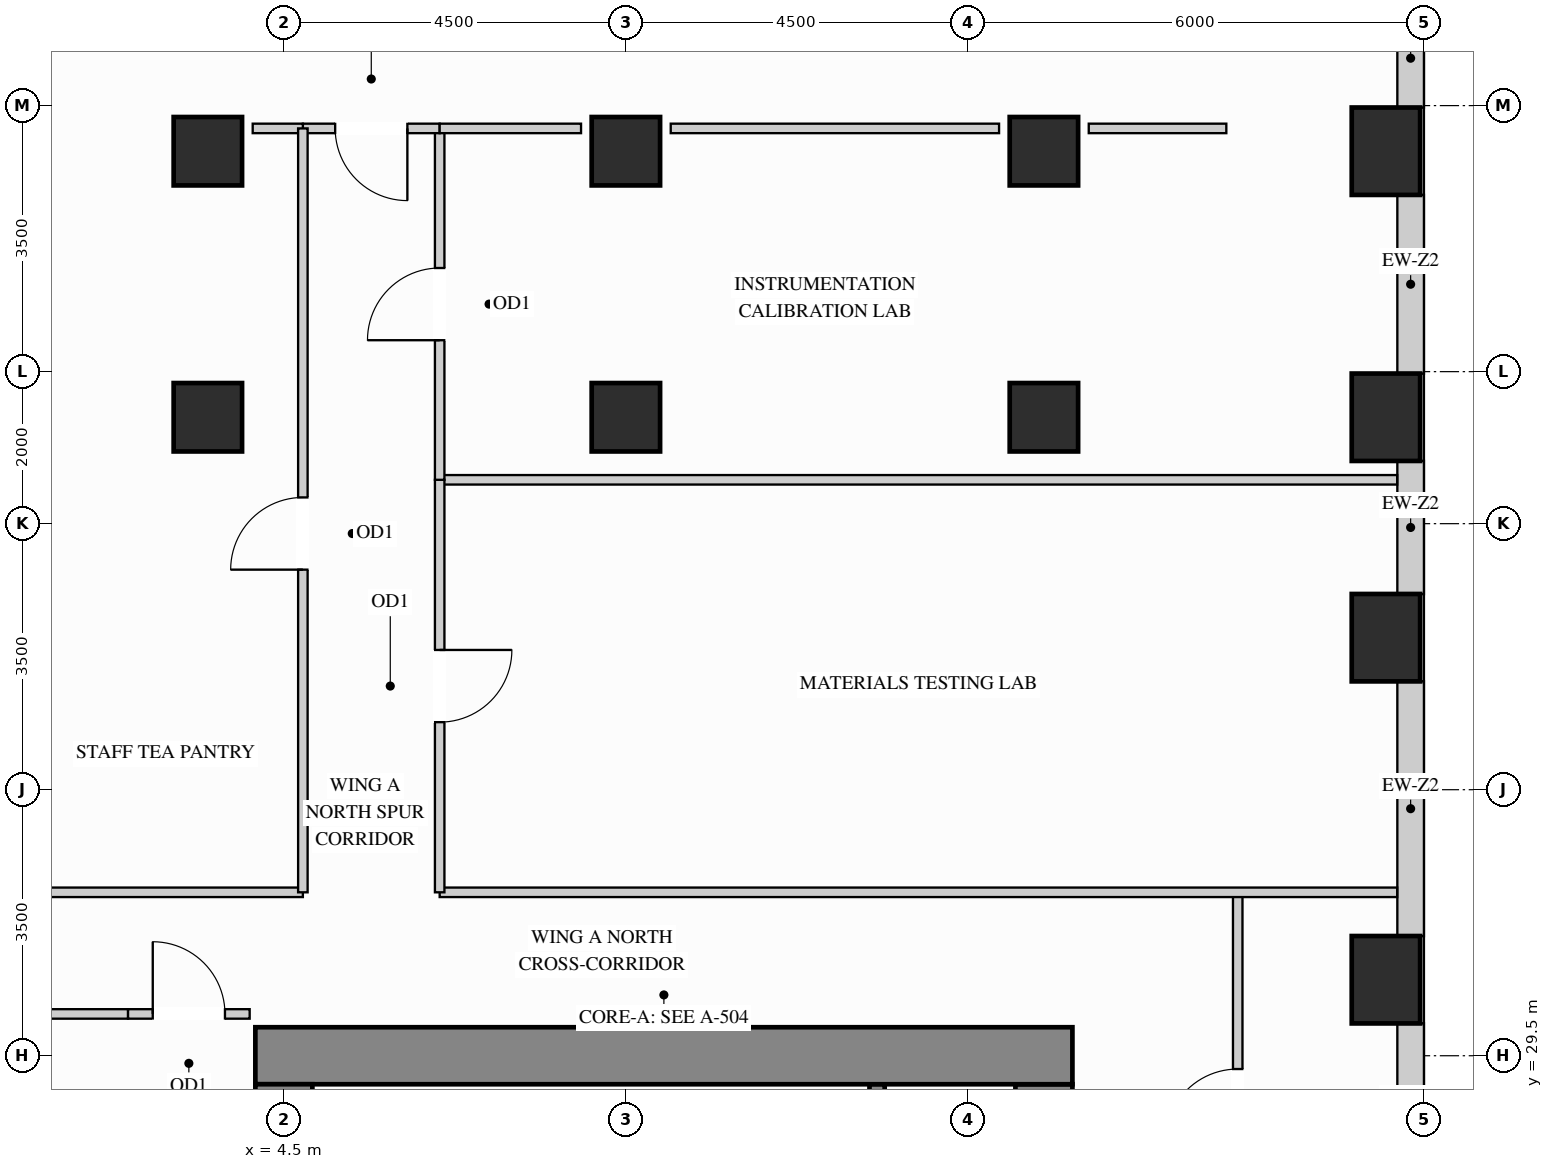
"""IFC4 building model, lengths in metres.
Left out: names, types, materials, properties, quantities, classifications, styles, units other than length and angle.
Written with IfcOpenShell. Run it as: python <this file> out.ifc"""

import sys

from ifc_helpers import new_model, si_unit, direction, frame, frame_2d, origin, origin_2d, place, context, subcontext, project, spatial, rectangle, extrude, source, transform, mapped, element, fill, save


model = new_model("IFC4")
c1 = context("Model", 3, precision=1e-05, world=origin(), true_north=direction((0.0, 1.0)))
c2 = subcontext(c1, "Body", "Model", "MODEL_VIEW")
j1 = project(units=[si_unit("LENGTHUNIT", "METRE"), si_unit("PLANEANGLEUNIT", "RADIAN")], contexts=[c1])
p1 = place(None, origin())
s1 = spatial("IfcSite", under=j1, at=p1, CompositionType="ELEMENT")
p2 = place(p1, origin())
s2 = spatial("IfcBuilding", under=s1, at=p2, CompositionType="ELEMENT")
p3 = place(p2, frame((0.0, 0.0, 120.6)))
s3 = spatial("IfcBuildingStorey", under=s2, at=p3, CompositionType="ELEMENT", Elevation=120.6)
m1 = source(origin(), c2, "Body", "SweptSolid", [
    extrude(rectangle(XDim=0.9, YDim=0.9, at=origin_2d()), origin(), (0.0, 0.0, 1.0), 3.38),
])
for number, where, z_axis, x_axis in (
    (1, (14.5, 37.9, 0.0), (0.0, 0.0, 1.0), (1.0, 0.0, 0.0)),
    (2, (14.5, 41.4, 0.0), (0.0, 0.0, 1.0), (1.0, 0.0, 0.0)),
    (3, (3.5, 37.9, 0.0), (0.0, 0.0, 1.0), (1.0, 0.0, 0.0)),
    (4, (3.5, 41.4, 0.0), (0.0, 0.0, 1.0), (1.0, 0.0, 0.0)),
    (5, (9.0, 37.9, 0.0), (0.0, 0.0, 1.0), (1.0, 0.0, 0.0)),
    (6, (9.0, 41.4, 0.0), (0.0, 0.0, 1.0), (1.0, 0.0, 0.0)),
):
    element("IfcColumn", number, at=place(p3, frame(where, z_axis=z_axis, x_axis=x_axis)), inside=s3, PredefinedType="COLUMN", context=c2, shape_type="MappedRepresentation", body=[
        mapped(m1, transform((0.0, 0.0, 0.0), x_axis=(1.0, 0.0, 0.0), y_axis=(0.0, 1.0, 0.0), z_axis=(0.0, 0.0, 1.0))),
    ])
m2 = source(origin(), c2, "Body", "SweptSolid", [
    extrude(rectangle(XDim=0.9, YDim=1.15, at=origin_2d()), origin(), (0.0, 0.0, 1.0), 3.38),
])
for number, where, z_axis, x_axis in (
    (7, (19.0, 30.5, 0.0), (0.0, 0.0, 1.0), (1.0, 0.0, 0.0)),
    (8, (19.0, 35.0, 0.0), (0.0, 0.0, 1.0), (1.0, 0.0, 0.0)),
    (9, (19.0, 37.9, 0.0), (0.0, 0.0, 1.0), (1.0, 0.0, 0.0)),
    (10, (19.0, 41.4, 0.0), (0.0, 0.0, 1.0), (1.0, 0.0, 0.0)),
):
    element("IfcColumn", number, at=place(p3, frame(where, z_axis=z_axis, x_axis=x_axis)), inside=s3, PredefinedType="COLUMN", context=c2, shape_type="MappedRepresentation", body=[
        mapped(m2, transform((0.0, 0.0, 0.0), x_axis=(1.0, 0.0, 0.0), y_axis=(0.0, 1.0, 0.0), z_axis=(0.0, 0.0, 1.0))),
    ])
m3 = source(origin(), c2, "Body", "SweptSolid", [
    extrude(rectangle(XDim=8.245, YDim=0.75, at=frame_2d((4.123, 0.0))), origin(), (0.0, 0.0, 1.0), 3.38),
])
p4 = place(p3, frame((14.5, 20.88, 0.0), z_axis=(0.0, 0.0, 1.0), x_axis=(0.0, 1.0, 0.0)))
e11 = element("IfcWall", 11, at=p4, inside=s3, PredefinedType="SHEAR", context=c2, shape_type="MappedRepresentation", body=[
    mapped(m3, transform((0.0, 0.0, 0.0), x_axis=(1.0, 0.0, 0.0), y_axis=(0.0, 1.0, 0.0), z_axis=(0.0, 0.0, 1.0))),
])
m4 = source(origin(), c2, "Body", "SweptSolid", [
    extrude(rectangle(XDim=10.75, YDim=0.75, at=frame_2d((5.375, 0.0))), origin(), (0.0, 0.0, 1.0), 3.38),
])
p5 = place(p3, frame((4.125, 29.5, 0.0), z_axis=(0.0, 0.0, 1.0), x_axis=(1.0, 0.0, 0.0)))
e12 = element("IfcWall", 12, at=p5, inside=s3, PredefinedType="SHEAR", context=c2, shape_type="MappedRepresentation", body=[
    mapped(m4, transform((0.0, 0.0, 0.0), x_axis=(1.0, 0.0, 0.0), y_axis=(0.0, 1.0, 0.0), z_axis=(0.0, 0.0, 1.0))),
])
m5 = source(origin(), c2, "Body", "SweptSolid", [
    extrude(rectangle(XDim=20.25, YDim=0.75, at=frame_2d((10.125, 0.0))), origin(), (0.0, 0.0, 1.0), 3.38),
])
p6 = place(p3, frame((4.5, 8.875, 0.0), z_axis=(0.0, 0.0, 1.0), x_axis=(0.0, 1.0, 0.0)))
e13 = element("IfcWall", 13, at=p6, inside=s3, PredefinedType="SHEAR", context=c2, shape_type="MappedRepresentation", body=[
    mapped(m5, transform((0.0, 0.0, 0.0), x_axis=(1.0, 0.0, 0.0), y_axis=(0.0, 1.0, 0.0), z_axis=(0.0, 0.0, 1.0))),
])
p7 = place(p3, frame((19.325, 27.373, 0.0), z_axis=(0.0, 0.0, 1.0), x_axis=(0.0, 1.0, 0.0)))
e14 = element("IfcWall", 14, at=p7, inside=s3, PredefinedType="SOLIDWALL", context=c2, shape_type="SweptSolid", body=[
    extrude(rectangle(XDim=2.554, YDim=0.35, at=frame_2d((1.277, 0.0))), origin(), (0.0, 0.0, 1.0), 2.519),
])
p8 = place(p7, frame((0.48, 0.0, 0.78)))
e15 = element("IfcOpeningElement", 15, at=p8, cuts=e14, PredefinedType="OPENING", context=c2, shape_type="SweptSolid", body=[
    extrude(rectangle(XDim=1.2, YDim=1.559, at=frame_2d((0.6, 0.78))), frame((0.0, 0.185, 0.0), z_axis=(0.0, -1.0, 0.0), x_axis=(1.0, 0.0, 0.0)), (0.0, 0.0, 1.0), 0.37),
])
m6 = source(origin(), c2, "Body", "SweptSolid", [
    extrude(rectangle(XDim=3.354, YDim=0.35, at=frame_2d((1.677, 0.0))), origin(), (0.0, 0.0, 1.0), 2.519),
])
p9 = place(p3, frame((19.325, 31.073, 0.0), z_axis=(0.0, 0.0, 1.0), x_axis=(0.0, 1.0, 0.0)))
e16 = element("IfcWall", 16, at=p9, inside=s3, PredefinedType="SOLIDWALL", context=c2, shape_type="MappedRepresentation", body=[
    mapped(m6, transform((0.0, 0.0, 0.0), x_axis=(1.0, 0.0, 0.0), y_axis=(0.0, 1.0, 0.0), z_axis=(0.0, 0.0, 1.0))),
])
m7 = source(origin(), c2, "Body", "SweptSolid", [
    extrude(rectangle(XDim=1.754, YDim=0.35, at=frame_2d((0.877, 0.0))), origin(), (0.0, 0.0, 1.0), 2.519),
])
p10 = place(p3, frame((19.325, 35.573, 0.0), z_axis=(0.0, 0.0, 1.0), x_axis=(0.0, 1.0, 0.0)))
e17 = element("IfcWall", 17, at=p10, inside=s3, PredefinedType="SOLIDWALL", context=c2, shape_type="MappedRepresentation", body=[
    mapped(m7, transform((0.0, 0.0, 0.0), x_axis=(1.0, 0.0, 0.0), y_axis=(0.0, 1.0, 0.0), z_axis=(0.0, 0.0, 1.0))),
])
m8 = source(origin(), c2, "Body", "SweptSolid", [
    extrude(rectangle(XDim=2.354, YDim=0.35, at=frame_2d((1.177, 0.0))), origin(), (0.0, 0.0, 1.0), 2.519),
])
p11 = place(p3, frame((19.325, 38.473, 0.0), z_axis=(0.0, 0.0, 1.0), x_axis=(0.0, 1.0, 0.0)))
e18 = element("IfcWall", 18, at=p11, inside=s3, PredefinedType="SOLIDWALL", context=c2, shape_type="MappedRepresentation", body=[
    mapped(m8, transform((0.0, 0.0, 0.0), x_axis=(1.0, 0.0, 0.0), y_axis=(0.0, 1.0, 0.0), z_axis=(0.0, 0.0, 1.0))),
])
m9 = source(origin(), c2, "Body", "SweptSolid", [
    extrude(rectangle(XDim=1.179, YDim=0.35, at=frame_2d((0.59, 0.0))), origin(), (0.0, 0.0, 1.0), 3.365),
])
p12 = place(p3, frame((19.325, 41.973, 0.0), z_axis=(0.0, 0.0, 1.0), x_axis=(0.0, 1.0, 0.0)))
e19 = element("IfcWall", 19, at=p12, inside=s3, PredefinedType="SOLIDWALL", context=c2, shape_type="MappedRepresentation", body=[
    mapped(m9, transform((0.0, 0.0, 0.0), x_axis=(1.0, 0.0, 0.0), y_axis=(0.0, 1.0, 0.0), z_axis=(0.0, 0.0, 1.0))),
])
p13 = place(p3, frame((17.05, 26.05, 0.0), z_axis=(0.0, 0.0, 1.0), x_axis=(0.0, 1.0, 0.0)))
e20 = element("IfcWall", 20, at=p13, inside=s3, PredefinedType="PARTITIONING", context=c2, shape_type="SweptSolid", body=[
    extrude(rectangle(XDim=5.6, YDim=0.125, at=frame_2d((2.8, 0.0))), origin(), (0.0, 0.0, 1.0), 3.365),
])
p14 = place(p13, frame((2.325, 0.0, 0.0)))
e21 = element("IfcOpeningElement", 21, at=p14, cuts=e20, PredefinedType="OPENING", context=c2, shape_type="SweptSolid", body=[
    extrude(rectangle(XDim=0.95, YDim=2.15, at=frame_2d((0.475, 1.075))), frame((0.0, 0.073, 0.0), z_axis=(0.0, -1.0, 0.0), x_axis=(1.0, 0.0, 0.0)), (0.0, 0.0, 1.0), 0.145),
])
m10 = source(origin(), c2, "Body", "SweptSolid", [
    extrude(rectangle(XDim=12.598, YDim=0.125, at=frame_2d((6.299, 0.0))), origin(), (0.0, 0.0, 1.0), 3.365),
])
p15 = place(p3, frame((6.55, 37.077, 0.0), z_axis=(0.0, 0.0, 1.0), x_axis=(1.0, 0.0, 0.0)))
e22 = element("IfcWall", 22, at=p15, inside=s3, PredefinedType="PARTITIONING", context=c2, shape_type="MappedRepresentation", body=[
    mapped(m10, transform((0.0, 0.0, 0.0), x_axis=(1.0, 0.0, 0.0), y_axis=(0.0, 1.0, 0.0), z_axis=(0.0, 0.0, 1.0))),
])
m11 = source(origin(), c2, "Body", "SweptSolid", [
    extrude(rectangle(XDim=12.598, YDim=0.125, at=frame_2d((6.299, 0.0))), origin(), (0.0, 0.0, 1.0), 2.828),
])
p16 = place(p3, frame((6.55, 31.65, 0.0), z_axis=(0.0, 0.0, 1.0), x_axis=(1.0, 0.0, 0.0)))
e23 = element("IfcWall", 23, at=p16, inside=s3, PredefinedType="PARTITIONING", context=c2, shape_type="MappedRepresentation", body=[
    mapped(m11, transform((0.0, 0.0, 0.0), x_axis=(1.0, 0.0, 0.0), y_axis=(0.0, 1.0, 0.0), z_axis=(0.0, 0.0, 1.0))),
])
m12 = source(origin(), c2, "Body", "SweptSolid", [
    extrude(rectangle(XDim=4.398, YDim=0.125, at=frame_2d((2.199, 0.0))), origin(), (0.0, 0.0, 1.0), 2.828),
])
p17 = place(p3, frame((0.352, 31.65, 0.0), z_axis=(0.0, 0.0, 1.0), x_axis=(1.0, 0.0, 0.0)))
e24 = element("IfcWall", 24, at=p17, inside=s3, PredefinedType="PARTITIONING", context=c2, shape_type="MappedRepresentation", body=[
    mapped(m12, transform((0.0, 0.0, 0.0), x_axis=(1.0, 0.0, 0.0), y_axis=(0.0, 1.0, 0.0), z_axis=(0.0, 0.0, 1.0))),
])
m13 = source(origin(), c2, "Body", "SweptSolid", [
    extrude(rectangle(XDim=1.26, YDim=0.125, at=frame_2d((0.63, 0.0))), origin(), (0.0, 0.0, 1.0), 3.365),
])
p18 = place(p3, frame((1.19, 30.05, 0.0), z_axis=(0.0, 0.0, 1.0), x_axis=(1.0, 0.0, 0.0)))
e25 = element("IfcWall", 25, at=p18, inside=s3, PredefinedType="PARTITIONING", context=c2, shape_type="MappedRepresentation", body=[
    mapped(m13, transform((0.0, 0.0, 0.0), x_axis=(1.0, 0.0, 0.0), y_axis=(0.0, 1.0, 0.0), z_axis=(0.0, 0.0, 1.0))),
])
p19 = place(p3, frame((2.45, 30.05, 0.0), z_axis=(0.0, 0.0, 1.0), x_axis=(1.0, 0.0, 0.0)))
e26 = element("IfcWall", 26, at=p19, inside=s3, PredefinedType="PARTITIONING", context=c2, shape_type="SweptSolid", body=[
    extrude(rectangle(XDim=1.6, YDim=0.125, at=frame_2d((0.8, 0.0))), origin(), (0.0, 0.0, 1.0), 3.365),
])
p20 = place(p19, frame((0.325, 0.0, 0.0)))
e27 = element("IfcOpeningElement", 27, at=p20, cuts=e26, PredefinedType="OPENING", context=c2, shape_type="SweptSolid", body=[
    extrude(rectangle(XDim=0.95, YDim=2.15, at=frame_2d((0.475, 1.075))), frame((0.0, 0.073, 0.0), z_axis=(0.0, -1.0, 0.0), x_axis=(1.0, 0.0, 0.0)), (0.0, 0.0, 1.0), 0.145),
])
p21 = place(p3, frame((6.55, 31.65, 0.0), z_axis=(0.0, 0.0, 1.0), x_axis=(0.0, 1.0, 0.0)))
e28 = element("IfcWall", 28, at=p21, inside=s3, PredefinedType="PARTITIONING", context=c2, shape_type="SweptSolid", body=[
    extrude(rectangle(XDim=5.427, YDim=0.125, at=frame_2d((2.713, 0.0))), origin(), (0.0, 0.0, 1.0), 3.365),
])
p22 = place(p21, frame((2.239, 0.0, 0.0)))
e29 = element("IfcOpeningElement", 29, at=p22, cuts=e28, PredefinedType="OPENING", context=c2, shape_type="SweptSolid", body=[
    extrude(rectangle(XDim=0.95, YDim=2.15, at=frame_2d((0.475, 1.075))), frame((0.0, 0.073, 0.0), z_axis=(0.0, -1.0, 0.0), x_axis=(1.0, 0.0, 0.0)), (0.0, 0.0, 1.0), 0.145),
])
p23 = place(p3, frame((6.55, 37.077, 0.0), z_axis=(0.0, 0.0, 1.0), x_axis=(0.0, 1.0, 0.0)))
e30 = element("IfcWall", 30, at=p23, inside=s3, PredefinedType="PARTITIONING", context=c2, shape_type="SweptSolid", body=[
    extrude(rectangle(XDim=4.623, YDim=0.125, at=frame_2d((2.312, 0.0))), origin(), (0.0, 0.0, 1.0), 3.365),
])
p24 = place(p23, frame((1.836, 0.0, 0.0)))
e31 = element("IfcOpeningElement", 31, at=p24, cuts=e30, PredefinedType="OPENING", context=c2, shape_type="SweptSolid", body=[
    extrude(rectangle(XDim=0.95, YDim=2.15, at=frame_2d((0.475, 1.075))), frame((0.0, 0.073, 0.0), z_axis=(0.0, -1.0, 0.0), x_axis=(1.0, 0.0, 0.0)), (0.0, 0.0, 1.0), 0.145),
])
p25 = place(p3, frame((4.75, 41.7, 0.0), z_axis=(0.0, 0.0, 1.0), x_axis=(1.0, 0.0, 0.0)))
e32 = element("IfcWall", 32, at=p25, inside=s3, PredefinedType="PARTITIONING", context=c2, shape_type="SweptSolid", body=[
    extrude(rectangle(XDim=1.8, YDim=0.125, at=frame_2d((0.9, 0.0))), origin(), (0.0, 0.0, 1.0), 3.365),
])
p26 = place(p25, frame((0.425, 0.0, 0.0)))
e33 = element("IfcOpeningElement", 33, at=p26, cuts=e32, PredefinedType="OPENING", context=c2, shape_type="SweptSolid", body=[
    extrude(rectangle(XDim=0.95, YDim=2.15, at=frame_2d((0.475, 1.075))), frame((0.0, 0.073, 0.0), z_axis=(0.0, -1.0, 0.0), x_axis=(1.0, 0.0, 0.0)), (0.0, 0.0, 1.0), 0.145),
])
m14 = source(origin(), c2, "Body", "SweptSolid", [
    extrude(rectangle(XDim=1.86, YDim=0.125, at=frame_2d((0.93, 0.0))), origin(), (0.0, 0.0, 1.0), 3.365),
])
p27 = place(p3, frame((6.55, 41.7, 0.0), z_axis=(0.0, 0.0, 1.0), x_axis=(1.0, 0.0, 0.0)))
e34 = element("IfcWall", 34, at=p27, inside=s3, PredefinedType="PARTITIONING", context=c2, shape_type="MappedRepresentation", body=[
    mapped(m14, transform((0.0, 0.0, 0.0), x_axis=(1.0, 0.0, 0.0), y_axis=(0.0, 1.0, 0.0), z_axis=(0.0, 0.0, 1.0))),
])
m15 = source(origin(), c2, "Body", "SweptSolid", [
    extrude(rectangle(XDim=4.32, YDim=0.125, at=frame_2d((2.16, 0.0))), origin(), (0.0, 0.0, 1.0), 3.365),
])
p28 = place(p3, frame((9.59, 41.7, 0.0), z_axis=(0.0, 0.0, 1.0), x_axis=(1.0, 0.0, 0.0)))
e35 = element("IfcWall", 35, at=p28, inside=s3, PredefinedType="PARTITIONING", context=c2, shape_type="MappedRepresentation", body=[
    mapped(m15, transform((0.0, 0.0, 0.0), x_axis=(1.0, 0.0, 0.0), y_axis=(0.0, 1.0, 0.0), z_axis=(0.0, 0.0, 1.0))),
])
m16 = source(origin(), c2, "Body", "SweptSolid", [
    extrude(rectangle(XDim=1.81, YDim=0.125, at=frame_2d((0.905, 0.0))), origin(), (0.0, 0.0, 1.0), 3.365),
])
p29 = place(p3, frame((15.09, 41.7, 0.0), z_axis=(0.0, 0.0, 1.0), x_axis=(1.0, 0.0, 0.0)))
e36 = element("IfcWall", 36, at=p29, inside=s3, PredefinedType="PARTITIONING", context=c2, shape_type="MappedRepresentation", body=[
    mapped(m16, transform((0.0, 0.0, 0.0), x_axis=(1.0, 0.0, 0.0), y_axis=(0.0, 1.0, 0.0), z_axis=(0.0, 0.0, 1.0))),
])
m17 = source(origin(), c2, "Body", "SweptSolid", [
    extrude(rectangle(XDim=0.66, YDim=0.125, at=frame_2d((0.33, 0.0))), origin(), (0.0, 0.0, 1.0), 3.365),
])
p30 = place(p3, frame((4.09, 41.7, 0.0), z_axis=(0.0, 0.0, 1.0), x_axis=(1.0, 0.0, 0.0)))
e37 = element("IfcWall", 37, at=p30, inside=s3, PredefinedType="PARTITIONING", context=c2, shape_type="MappedRepresentation", body=[
    mapped(m17, transform((0.0, 0.0, 0.0), x_axis=(1.0, 0.0, 0.0), y_axis=(0.0, 1.0, 0.0), z_axis=(0.0, 0.0, 1.0))),
])
p31 = place(p3, frame((4.75, 31.65, 0.0), z_axis=(0.0, 0.0, 1.0), x_axis=(0.0, 1.0, 0.0)))
e38 = element("IfcWall", 38, at=p31, inside=s3, PredefinedType="PARTITIONING", context=c2, shape_type="SweptSolid", body=[
    extrude(rectangle(XDim=10.05, YDim=0.125, at=frame_2d((5.025, 0.0))), origin(), (0.0, 0.0, 1.0), 3.365),
])
p32 = place(p31, frame((4.245, 0.0, 0.0)))
e39 = element("IfcOpeningElement", 39, at=p32, cuts=e38, PredefinedType="OPENING", context=c2, shape_type="SweptSolid", body=[
    extrude(rectangle(XDim=0.95, YDim=2.15, at=frame_2d((0.475, 1.075))), frame((0.0, 0.073, 0.0), z_axis=(0.0, -1.0, 0.0), x_axis=(1.0, 0.0, 0.0)), (0.0, 0.0, 1.0), 0.145),
])
m18 = source(origin(), c2, "Body", "SweptSolid", [
    extrude(rectangle(XDim=3.678, YDim=0.2, at=frame_2d((1.839, 0.0))), origin(), (0.0, 0.0, 1.0), 3.38),
])
p33 = place(p3, frame((12.305, 25.445, 0.0), z_axis=(0.0, 0.0, 1.0), x_axis=(0.0, 1.0, 0.0)))
e40 = element("IfcWall", 40, at=p33, inside=s3, PredefinedType="SHEAR", context=c2, shape_type="MappedRepresentation", body=[
    mapped(m18, transform((0.0, 0.0, 0.0), x_axis=(1.0, 0.0, 0.0), y_axis=(0.0, 1.0, 0.0), z_axis=(0.0, 0.0, 1.0))),
])
m19 = source(origin(), c2, "Body", "SweptSolid", [
    extrude(rectangle(XDim=0.95, YDim=2.15, at=frame_2d((0.475, 1.075))), frame((0.0, 0.025, 0.0), z_axis=(0.0, -1.0, 0.0), x_axis=(1.0, 0.0, 0.0)), (0.0, 0.0, 1.0), 0.05),
])
p34 = place(p14, origin())
e41 = element("IfcDoor", 41, at=p34, inside=s3, OperationType="SINGLE_SWING_LEFT", PredefinedType="DOOR", context=c2, shape_type="MappedRepresentation", body=[
    mapped(m19, transform((0.0, 0.0, 0.0), x_axis=(1.0, 0.0, 0.0), y_axis=(0.0, 1.0, 0.0), z_axis=(0.0, 0.0, 1.0))),
])
fill(e21, e41)
p35 = place(p22, origin())
e42 = element("IfcDoor", 42, at=p35, inside=s3, OperationType="SINGLE_SWING_RIGHT", PredefinedType="DOOR", context=c2, shape_type="MappedRepresentation", body=[
    mapped(m19, transform((0.0, 0.0, 0.0), x_axis=(1.0, 0.0, 0.0), y_axis=(0.0, 1.0, 0.0), z_axis=(0.0, 0.0, 1.0))),
])
fill(e29, e42)
p36 = place(p24, origin())
e43 = element("IfcDoor", 43, at=p36, inside=s3, OperationType="SINGLE_SWING_LEFT", PredefinedType="DOOR", context=c2, shape_type="MappedRepresentation", body=[
    mapped(m19, transform((0.0, 0.0, 0.0), x_axis=(1.0, 0.0, 0.0), y_axis=(0.0, 1.0, 0.0), z_axis=(0.0, 0.0, 1.0))),
])
fill(e31, e43)
p37 = place(p26, origin())
e44 = element("IfcDoor", 44, at=p37, inside=s3, OperationType="SINGLE_SWING_RIGHT", PredefinedType="DOOR", context=c2, shape_type="MappedRepresentation", body=[
    mapped(m19, transform((0.0, 0.0, 0.0), x_axis=(1.0, 0.0, 0.0), y_axis=(0.0, 1.0, 0.0), z_axis=(0.0, 0.0, 1.0))),
])
fill(e33, e44)
p38 = place(p32, origin())
e45 = element("IfcDoor", 45, at=p38, inside=s3, OperationType="SINGLE_SWING_LEFT", PredefinedType="DOOR", context=c2, shape_type="MappedRepresentation", body=[
    mapped(m19, transform((0.0, 0.0, 0.0), x_axis=(1.0, 0.0, 0.0), y_axis=(0.0, 1.0, 0.0), z_axis=(0.0, 0.0, 1.0))),
])
fill(e39, e45)
p39 = place(p20, origin())
e46 = element("IfcDoor", 46, at=p39, inside=s3, OperationType="SINGLE_SWING_LEFT", PredefinedType="DOOR", context=c2, shape_type="MappedRepresentation", body=[
    mapped(m19, transform((0.0, 0.0, 0.0), x_axis=(1.0, 0.0, 0.0), y_axis=(0.0, 1.0, 0.0), z_axis=(0.0, 0.0, 1.0))),
])
fill(e27, e46)
m20 = source(origin(), c2, "Body", "SweptSolid", [
    extrude(rectangle(XDim=1.2, YDim=1.559, at=frame_2d((0.6, 0.78))), frame((0.0, 0.03, 0.0), z_axis=(0.0, -1.0, 0.0), x_axis=(1.0, 0.0, 0.0)), (0.0, 0.0, 1.0), 0.06),
])
p40 = place(p8, origin())
e47 = element("IfcWindow", 47, at=p40, inside=s3, PartitioningType="SINGLE_PANEL", PredefinedType="WINDOW", context=c2, shape_type="MappedRepresentation", body=[
    mapped(m20, transform((0.0, 0.0, 0.0), x_axis=(1.0, 0.0, 0.0), y_axis=(0.0, 1.0, 0.0), z_axis=(0.0, 0.0, 1.0))),
])
fill(e15, e47)
save(model, sys.argv[1])
